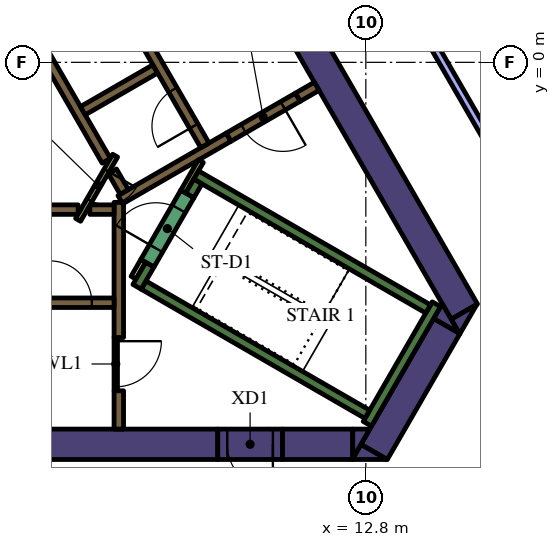
"""IFC4 building model, lengths in metres.
Left out: names, types, materials, properties, quantities, classifications, styles, units other than length and angle.
Written with IfcOpenShell. Run it as: python <this file> out.ifc"""

import sys

from ifc_helpers import new_model, si_unit, direction, frame, frame_2d, origin, place, context, subcontext, project, spatial, polyline, rectangle, outline, extrude, element, fill, save


model = new_model("IFC4")
c1 = context("Model", 3, precision=1e-05, world=origin(), true_north=direction((0.0, 1.0)))
c2 = subcontext(c1, "Body", "Model", "MODEL_VIEW")
j1 = project(units=[si_unit("LENGTHUNIT", "METRE"), si_unit("PLANEANGLEUNIT", "RADIAN")], contexts=[c1])
p1 = place(None, origin())
s1 = spatial("IfcSite", under=j1, at=p1, CompositionType="ELEMENT")
p2 = place(p1, origin())
s2 = spatial("IfcBuilding", under=s1, at=p2, CompositionType="ELEMENT")
p3 = place(p2, frame((0.0, 0.0, 141.6)))
s3 = spatial("IfcBuildingStorey", under=s2, at=p3, CompositionType="ELEMENT", Elevation=141.6)
p4 = place(p3, frame((9.129, 4.289, 0.0), z_axis=(0.0, 0.0, 1.0), x_axis=(0.499995742806, -0.866027861663, 0.0)))
e1 = element("IfcWall", 1, at=p4, inside=s3, PredefinedType="SOLIDWALL", context=c2, shape_type="SweptSolid", body=[
    extrude(rectangle(XDim=12.527, YDim=0.8, at=frame_2d((6.264, 0.0))), origin(), (0.0, 0.0, 1.0), 4.2),
])
p5 = place(p3, origin())
e2 = element("IfcWall", 2, at=p5, inside=s3, PredefinedType="SOLIDWALL", context=c2, shape_type="SweptSolid", body=[
    extrude(outline(polyline([(15.271, -7.15), (15.047, -6.762), (15.719, -6.374), (15.271, -7.15)])), origin(), (0.0, 0.0, 1.0), 4.2),
])
p6 = place(p3, frame((13.018, -10.252, 0.0), z_axis=(0.0, 0.0, 1.0), x_axis=(0.499984020225, 0.866034629516, 0.0)))
e3 = element("IfcWall", 3, at=p6, inside=s3, PredefinedType="SOLIDWALL", context=c2, shape_type="SweptSolid", body=[
    extrude(rectangle(XDim=3.824, YDim=0.8, at=frame_2d((1.912, 0.0))), origin(), (0.0, 0.0, 1.0), 4.2),
])
e4 = element("IfcWall", 4, at=p5, inside=s3, PredefinedType="SOLIDWALL", context=c2, shape_type="SweptSolid", body=[
    extrude(outline(polyline([(12.671, -10.053), (13.358, -10.45), (12.442, -10.45), (12.671, -10.053)])), origin(), (0.0, 0.0, 1.0), 4.2),
])
e5 = element("IfcWall", 5, at=p5, inside=s3, PredefinedType="SOLIDWALL", context=c2, shape_type="SweptSolid", body=[
    extrude(outline(polyline([(14.809, -6.35), (15.257, -7.126), (14.585, -6.738), (14.809, -6.35)])), origin(), (0.0, 0.0, 1.0), 4.2),
])
p7 = place(p3, frame((10.604, -10.05, 0.0), z_axis=(0.0, 0.0, 1.0), x_axis=(1.0, 0.0, 0.0)))
e6 = element("IfcWall", 6, at=p7, inside=s3, PredefinedType="SOLIDWALL", context=c2, shape_type="SweptSolid", body=[
    extrude(rectangle(XDim=1.849, YDim=0.8, at=frame_2d((0.925, 0.0))), origin(), (0.0, 0.0, 1.0), 4.2),
])
e7 = element("IfcWall", 7, at=p5, inside=s3, PredefinedType="SOLIDWALL", context=c2, shape_type="SweptSolid", body=[
    extrude(outline(polyline([(12.904, -9.65), (12.456, -10.426), (12.456, -9.65), (12.904, -9.65)])), origin(), (0.0, 0.0, 1.0), 4.2),
])
p8 = place(p3, frame((-13.378, -10.05, 0.0), z_axis=(0.0, 0.0, 1.0), x_axis=(1.0, 0.0, 0.0)))
e8 = element("IfcWall", 8, at=p8, inside=s3, PredefinedType="SOLIDWALL", context=c2, shape_type="SweptSolid", body=[
    extrude(rectangle(XDim=22.282, YDim=0.8, at=frame_2d((11.141, 0.0))), origin(), (0.0, 0.0, 1.0), 4.2),
])
p9 = place(p3, frame((12.84, -9.511, 0.0), z_axis=(0.0, 0.0, 1.0), x_axis=(0.499997733992, 0.866026712061, 0.0)))
e9 = element("IfcWall", 9, at=p9, inside=s3, PredefinedType="SOLIDWALL", context=c2, shape_type="SweptSolid", body=[
    extrude(rectangle(XDim=3.634, YDim=0.25, at=frame_2d((1.817, 0.0))), origin(), (0.0, 0.0, 1.0), 4.2),
])
p10 = place(p3, frame((12.84, -9.261, 0.0), z_axis=(0.0, 0.0, 1.0), x_axis=(-0.866013990052, 0.500019768644, 0.0)))
e10 = element("IfcWall", 10, at=p10, inside=s3, PredefinedType="SOLIDWALL", context=c2, shape_type="SweptSolid", body=[
    extrude(rectangle(XDim=6.8, YDim=0.25, at=frame_2d((3.4, 0.0))), origin(), (0.0, 0.0, 1.0), 4.2),
])
p11 = place(p3, frame((6.78, -5.906, 0.0), z_axis=(0.0, 0.0, 1.0), x_axis=(0.500223362819, 0.865896406789, 0.0)))
e11 = element("IfcWall", 11, at=p11, inside=s3, PredefinedType="SOLIDWALL", context=c2, shape_type="SweptSolid", body=[
    extrude(rectangle(XDim=0.675, YDim=0.25, at=frame_2d((0.337, 0.0))), origin(), (0.0, 0.0, 1.0), 4.2),
])
p12 = place(p3, frame((8.334, -2.964, 0.0), z_axis=(0.0, 0.0, 1.0), x_axis=(0.866016039709, -0.500016218704, 0.0)))
e12 = element("IfcWall", 12, at=p12, inside=s3, PredefinedType="SOLIDWALL", context=c2, shape_type="SweptSolid", body=[
    extrude(rectangle(XDim=7.05, YDim=0.25, at=frame_2d((3.525, 0.0))), origin(), (0.0, 0.0, 1.0), 4.2),
])
p13 = place(p3, frame((8.168, -3.503, 0.0), z_axis=(0.0, 0.0, 1.0), x_axis=(0.49972245349, 0.866185586049, 0.0)))
e13 = element("IfcWall", 13, at=p13, inside=s3, PredefinedType="SOLIDWALL", context=c2, shape_type="SweptSolid", body=[
    extrude(rectangle(XDim=0.425, YDim=0.25, at=frame_2d((0.212, 0.0))), origin(), (0.0, 0.0, 1.0), 4.2),
])
p14 = place(p3, frame((-5.259, -3.875, 0.0), z_axis=(0.0, 0.0, 1.0), x_axis=(1.0, 0.0, 0.0)))
e14 = element("IfcWall", 14, at=p14, inside=s3, PredefinedType="SOLIDWALL", context=c2, shape_type="SweptSolid", body=[
    extrude(rectangle(XDim=10.489, YDim=0.25, at=frame_2d((5.244, 0.0))), origin(), (0.0, 0.0, 1.0), 4.2),
])
p15 = place(p3, frame((6.3, -7.24, 0.0), z_axis=(0.0, 0.0, 1.0), x_axis=(0.0, 1.0, 0.0)))
e15 = element("IfcWall", 15, at=p15, inside=s3, PredefinedType="SOLIDWALL", context=c2, shape_type="SweptSolid", body=[
    extrude(rectangle(XDim=3.556, YDim=0.25, at=frame_2d((1.778, 0.0))), origin(), (0.0, 0.0, 1.0), 4.2),
])
p16 = place(p3, frame((6.3, -9.65, 0.0), z_axis=(0.0, 0.0, 1.0), x_axis=(0.0, 1.0, 0.0)))
e16 = element("IfcWall", 16, at=p16, inside=s3, PredefinedType="SOLIDWALL", context=c2, shape_type="SweptSolid", body=[
    extrude(rectangle(XDim=1.008, YDim=0.25, at=frame_2d((0.504, 0.0))), origin(), (0.0, 0.0, 1.0), 4.2),
])
p17 = place(p3, frame((5.538, -3.875, 0.0), z_axis=(0.0, 0.0, 1.0), x_axis=(1.0, 0.0, 0.0)))
e17 = element("IfcWall", 17, at=p17, inside=s3, PredefinedType="SOLIDWALL", context=c2, shape_type="SweptSolid", body=[
    extrude(rectangle(XDim=0.637, YDim=0.25, at=frame_2d((0.318, 0.0))), origin(), (0.0, 0.0, 1.0), 4.2),
])
p18 = place(p3, frame((9.19, -1.969, 0.0), z_axis=(0.0, 0.0, 1.0), x_axis=(-0.866057109641, -0.499945079824, 0.0)))
e18 = element("IfcWall", 18, at=p18, inside=s3, PredefinedType="SOLIDWALL", context=c2, shape_type="SweptSolid", body=[
    extrude(rectangle(XDim=3.291, YDim=0.25, at=frame_2d((1.646, 0.0))), origin(), (0.0, 0.0, 1.0), 4.2),
])
p19 = place(p3, frame((6.13, -2.867, 0.0), z_axis=(0.0, 0.0, 1.0), x_axis=(0.500160776593, -0.865932559475, 0.0)))
e19 = element("IfcWall", 19, at=p19, inside=s3, PredefinedType="SOLIDWALL", context=c2, shape_type="SweptSolid", body=[
    extrude(rectangle(XDim=0.627, YDim=0.25, at=frame_2d((0.313, 0.0))), origin(), (0.0, 0.0, 1.0), 4.2),
])
p20 = place(p3, frame((11.507, -0.631, 0.0), z_axis=(0.0, 0.0, 1.0), x_axis=(-0.866093731455, -0.499881634324, 0.0)))
e20 = element("IfcWall", 20, at=p20, inside=s3, PredefinedType="SOLIDWALL", context=c2, shape_type="SweptSolid", body=[
    extrude(rectangle(XDim=0.575, YDim=0.25, at=frame_2d((0.288, 0.0))), origin(), (0.0, 0.0, 1.0), 4.2),
])
p21 = place(p3, frame((5.97, -2.591, 0.0), z_axis=(0.0, 0.0, 1.0), x_axis=(-0.499994469932, 0.866028596547, 0.0)))
e21 = element("IfcWall", 21, at=p21, inside=s3, PredefinedType="SOLIDWALL", context=c2, shape_type="SweptSolid", body=[
    extrude(rectangle(XDim=10.488, YDim=0.25, at=frame_2d((5.244, 0.0))), origin(), (0.0, 0.0, 1.0), 4.2),
])
p22 = place(p3, frame((5.354, -1.274, 0.0), z_axis=(0.0, 0.0, 1.0), x_axis=(0.866008176907, 0.50002983664, 0.0)))
e22 = element("IfcWall", 22, at=p22, inside=s3, PredefinedType="SOLIDWALL", context=c2, shape_type="SweptSolid", body=[
    extrude(rectangle(XDim=2.2, YDim=0.25, at=frame_2d((1.1, 0.0))), origin(), (0.0, 0.0, 1.0), 4.2),
])
p23 = place(p3, frame((6.945, -5.222, 0.0), z_axis=(0.0, 0.0, 1.0), x_axis=(-0.499818422106, -0.866130212453, 0.0)))
e23 = element("IfcWall", 23, at=p23, inside=s3, PredefinedType="PARTITIONING", context=c2, shape_type="SweptSolid", body=[
    extrude(rectangle(XDim=0.514, YDim=0.15, at=frame_2d((0.257, 0.0))), origin(), (0.0, 0.0, 1.0), 3.15),
])
p24 = place(p3, frame((8.459, -2.599, 0.0), z_axis=(0.0, 0.0, 1.0), x_axis=(-0.500041054325, -0.866001699761, 0.0)))
e24 = element("IfcWall", 24, at=p24, inside=s3, PredefinedType="PARTITIONING", context=c2, shape_type="SweptSolid", body=[
    extrude(rectangle(XDim=0.929, YDim=0.15, at=frame_2d((0.464, 0.0))), origin(), (0.0, 0.0, 1.0), 4.2),
])
p25 = place(p3, frame((-6.175, -6.325, 0.0), z_axis=(0.0, 0.0, 1.0), x_axis=(1.0, 0.0, 0.0)))
e25 = element("IfcWall", 25, at=p25, inside=s3, PredefinedType="SOLIDWALL", context=c2, shape_type="SweptSolid", body=[
    extrude(rectangle(XDim=12.35, YDim=0.25, at=frame_2d((6.175, 0.0))), origin(), (0.0, 0.0, 1.0), 4.2),
])
p26 = place(p25, frame((0.585, 0.0, 0.0)))
e26 = element("IfcOpeningElement", 26, at=p26, cuts=e25, PredefinedType="OPENING", context=c2, shape_type="SweptSolid", body=[
    extrude(rectangle(XDim=1.1, YDim=2.1, at=frame_2d((0.55, 1.05))), frame((0.0, 0.135, 0.0), z_axis=(0.0, -1.0, 0.0), x_axis=(1.0, 0.0, 0.0)), (0.0, 0.0, 1.0), 0.27),
])
p27 = place(p25, frame((3.105, 0.0, 0.0)))
e27 = element("IfcOpeningElement", 27, at=p27, cuts=e25, PredefinedType="OPENING", context=c2, shape_type="SweptSolid", body=[
    extrude(rectangle(XDim=1.1, YDim=2.1, at=frame_2d((0.55, 1.05))), frame((0.0, 0.135, 0.0), z_axis=(0.0, -1.0, 0.0), x_axis=(1.0, 0.0, 0.0)), (0.0, 0.0, 1.0), 0.27),
])
p28 = place(p25, frame((5.625, 0.0, 0.0)))
e28 = element("IfcOpeningElement", 28, at=p28, cuts=e25, PredefinedType="OPENING", context=c2, shape_type="SweptSolid", body=[
    extrude(rectangle(XDim=1.1, YDim=2.1, at=frame_2d((0.55, 1.05))), frame((0.0, 0.135, 0.0), z_axis=(0.0, -1.0, 0.0), x_axis=(1.0, 0.0, 0.0)), (0.0, 0.0, 1.0), 0.27),
])
p29 = place(p25, frame((8.145, 0.0, 0.0)))
e29 = element("IfcOpeningElement", 29, at=p29, cuts=e25, PredefinedType="OPENING", context=c2, shape_type="SweptSolid", body=[
    extrude(rectangle(XDim=1.1, YDim=2.1, at=frame_2d((0.55, 1.05))), frame((0.0, 0.135, 0.0), z_axis=(0.0, -1.0, 0.0), x_axis=(1.0, 0.0, 0.0)), (0.0, 0.0, 1.0), 0.27),
])
p30 = place(p25, frame((10.665, 0.0, 0.0)))
e30 = element("IfcOpeningElement", 30, at=p30, cuts=e25, PredefinedType="OPENING", context=c2, shape_type="SweptSolid", body=[
    extrude(rectangle(XDim=1.1, YDim=2.1, at=frame_2d((0.55, 1.05))), frame((0.0, 0.135, 0.0), z_axis=(0.0, -1.0, 0.0), x_axis=(1.0, 0.0, 0.0)), (0.0, 0.0, 1.0), 0.27),
])
p31 = place(p3, frame((8.565, -2.185, 0.0), z_axis=(0.0, 0.0, 1.0), x_axis=(-0.499997954832, 0.866026584559, 0.0)))
e31 = element("IfcWall", 31, at=p31, inside=s3, PredefinedType="SOLIDWALL", context=c2, shape_type="SweptSolid", body=[
    extrude(rectangle(XDim=12.35, YDim=0.25, at=frame_2d((6.175, 0.0))), origin(), (0.0, 0.0, 1.0), 4.2),
])
p32 = place(p31, frame((0.585, 0.0, 0.0)))
e32 = element("IfcOpeningElement", 32, at=p32, cuts=e31, PredefinedType="OPENING", context=c2, shape_type="SweptSolid", body=[
    extrude(rectangle(XDim=1.1, YDim=2.1, at=frame_2d((0.55, 1.05))), frame((0.0, 0.135, 0.0), z_axis=(0.0, -1.0, 0.0), x_axis=(1.0, 0.0, 0.0)), (0.0, 0.0, 1.0), 0.27),
])
p33 = place(p3, frame((7.053, -5.284, 0.0), z_axis=(0.0, 0.0, 1.0), x_axis=(0.500078061341, 0.865980330357, 0.0)))
e33 = element("IfcWall", 33, at=p33, inside=s3, PredefinedType="SOLIDWALL", context=c2, shape_type="SweptSolid", body=[
    extrude(rectangle(XDim=2.1, YDim=0.4, at=frame_2d((1.05, 0.0))), origin(), (0.0, 0.0, 1.0), 4.2),
])
p34 = place(p33, frame((0.45, 0.0, 0.0)))
e34 = element("IfcOpeningElement", 34, at=p34, cuts=e33, PredefinedType="OPENING", context=c2, shape_type="SweptSolid", body=[
    extrude(rectangle(XDim=1.2, YDim=2.1, at=frame_2d((0.6, 1.05))), frame((0.0, 0.21, 0.0), z_axis=(0.0, -1.0, 0.0), x_axis=(1.0, 0.0, 0.0)), (0.0, 0.0, 1.0), 0.42),
])
p35 = place(p3, frame((6.203, -2.456, 0.0), z_axis=(0.0, 0.0, 1.0), x_axis=(-0.500043961785, -0.866000020948, 0.0)))
e35 = element("IfcWall", 35, at=p35, inside=s3, PredefinedType="PARTITIONING", context=c2, shape_type="SweptSolid", body=[
    extrude(rectangle(XDim=1.95, YDim=0.15, at=frame_2d((0.975, 0.0))), origin(), (0.0, 0.0, 1.0), 4.2),
])
p36 = place(p35, frame((0.45, 0.0, 0.0)))
e36 = element("IfcOpeningElement", 36, at=p36, cuts=e35, PredefinedType="OPENING", context=c2, shape_type="SweptSolid", body=[
    extrude(rectangle(XDim=0.9, YDim=2.1, at=frame_2d((0.45, 1.05))), frame((0.0, 0.085, 0.0), z_axis=(0.0, -1.0, 0.0), x_axis=(1.0, 0.0, 0.0)), (0.0, 0.0, 1.0), 0.17),
])
p37 = place(p3, frame((6.22, -7.237, 0.0), z_axis=(0.0, 0.0, 1.0), x_axis=(0.0, -1.0, 0.0)))
e37 = element("IfcWall", 37, at=p37, inside=s3, PredefinedType="PARTITIONING", context=c2, shape_type="SweptSolid", body=[
    extrude(rectangle(XDim=1.4, YDim=0.09, at=frame_2d((0.7, 0.0))), origin(), (0.0, 0.0, 1.0), 3.15),
])
p38 = place(p37, frame((0.1, 0.0, 0.0)))
e38 = element("IfcOpeningElement", 38, at=p38, cuts=e37, PredefinedType="OPENING", context=c2, shape_type="SweptSolid", body=[
    extrude(rectangle(XDim=1.2, YDim=2.1, at=frame_2d((0.6, 1.05))), frame((0.0, 0.055, 0.0), z_axis=(0.0, -1.0, 0.0), x_axis=(1.0, 0.0, 0.0)), (0.0, 0.0, 1.0), 0.11),
])
p39 = place(p3, frame((11.009, -0.919, 0.0), z_axis=(0.0, 0.0, 1.0), x_axis=(-0.866059744384, -0.49994051562, 0.0)))
e39 = element("IfcWall", 39, at=p39, inside=s3, PredefinedType="SOLIDWALL", context=c2, shape_type="SweptSolid", body=[
    extrude(rectangle(XDim=2.1, YDim=0.25, at=frame_2d((1.05, 0.0))), origin(), (0.0, 0.0, 1.0), 4.2),
])
p40 = place(p39, frame((0.45, 0.0, 0.0)))
e40 = element("IfcOpeningElement", 40, at=p40, cuts=e39, PredefinedType="OPENING", context=c2, shape_type="SweptSolid", body=[
    extrude(rectangle(XDim=1.2, YDim=2.1, at=frame_2d((0.6, 1.05))), frame((0.0, 0.135, 0.0), z_axis=(0.0, -1.0, 0.0), x_axis=(1.0, 0.0, 0.0)), (0.0, 0.0, 1.0), 0.27),
])
p41 = place(p3, frame((10.604, -10.05, 0.0), z_axis=(0.0, 0.0, 1.0), x_axis=(-1.0, 0.0, 0.0)))
e41 = element("IfcWall", 41, at=p41, inside=s3, PredefinedType="SOLIDWALL", context=c2, shape_type="SweptSolid", body=[
    extrude(rectangle(XDim=1.7, YDim=0.8, at=frame_2d((0.85, 0.0))), origin(), (0.0, 0.0, 1.0), 4.2),
])
p42 = place(p41, frame((0.25, 0.0, 0.0)))
e42 = element("IfcOpeningElement", 42, at=p42, cuts=e41, PredefinedType="OPENING", context=c2, shape_type="SweptSolid", body=[
    extrude(rectangle(XDim=1.2, YDim=2.1, at=frame_2d((0.6, 1.05))), frame((0.0, 0.41, 0.0), z_axis=(0.0, -1.0, 0.0), x_axis=(1.0, 0.0, 0.0)), (0.0, 0.0, 1.0), 0.82),
])
p43 = place(p3, frame((14.825, -12.722, 0.0), z_axis=(0.0, 0.0, 1.0), x_axis=(0.499981686864, 0.86603597662, 0.0)))
e43 = element("IfcWall", 43, at=p43, inside=s3, PredefinedType="PARTITIONING", context=c2, shape_type="SweptSolid", body=[
    extrude(rectangle(XDim=3.506, YDim=0.2, at=frame_2d((1.753, 0.0))), origin(), (0.0, 0.0, 1.0), 3.15),
])
p44 = place(p3, frame((18.504, -6.35, 0.0), z_axis=(0.0, 0.0, 1.0), x_axis=(-0.499995029582, 0.866028273438, 0.0)))
e44 = element("IfcWall", 44, at=p44, inside=s3, PredefinedType="PARTITIONING", context=c2, shape_type="SweptSolid", body=[
    extrude(rectangle(XDim=9.717, YDim=0.2, at=frame_2d((4.859, 0.0))), origin(), (0.0, 0.0, 1.0), 3.15),
])
p45 = place(p30, origin())
e45 = element("IfcDoor", 45, at=p45, inside=s3, OperationType="DOUBLE_DOOR_SLIDING", PredefinedType="DOOR", context=c2, shape_type="SweptSolid", body=[
    extrude(rectangle(XDim=1.1, YDim=2.1, at=frame_2d((0.55, 1.05))), frame((0.0, 0.025, 0.0), z_axis=(0.0, -1.0, 0.0), x_axis=(1.0, 0.0, 0.0)), (0.0, 0.0, 1.0), 0.05),
])
fill(e30, e45)
p46 = place(p32, origin())
e46 = element("IfcDoor", 46, at=p46, inside=s3, OperationType="DOUBLE_DOOR_SLIDING", PredefinedType="DOOR", context=c2, shape_type="SweptSolid", body=[
    extrude(rectangle(XDim=1.1, YDim=2.1, at=frame_2d((0.55, 1.05))), frame((0.0, 0.025, 0.0), z_axis=(0.0, -1.0, 0.0), x_axis=(1.0, 0.0, 0.0)), (0.0, 0.0, 1.0), 0.05),
])
fill(e32, e46)
p47 = place(p34, origin())
e47 = element("IfcDoor", 47, at=p47, inside=s3, OperationType="SINGLE_SWING_LEFT", PredefinedType="DOOR", context=c2, shape_type="SweptSolid", body=[
    extrude(rectangle(XDim=1.2, YDim=2.1, at=frame_2d((0.6, 1.05))), frame((0.0, 0.025, 0.0), z_axis=(0.0, -1.0, 0.0), x_axis=(1.0, 0.0, 0.0)), (0.0, 0.0, 1.0), 0.05),
])
fill(e34, e47)
p48 = place(p36, origin())
e48 = element("IfcDoor", 48, at=p48, inside=s3, OperationType="SINGLE_SWING_LEFT", PredefinedType="DOOR", context=c2, shape_type="SweptSolid", body=[
    extrude(rectangle(XDim=0.9, YDim=2.1, at=frame_2d((0.45, 1.05))), frame((0.0, 0.025, 0.0), z_axis=(0.0, -1.0, 0.0), x_axis=(1.0, 0.0, 0.0)), (0.0, 0.0, 1.0), 0.05),
])
fill(e36, e48)
p49 = place(p38, origin())
e49 = element("IfcDoor", 49, at=p49, inside=s3, OperationType="SINGLE_SWING_LEFT", PredefinedType="DOOR", context=c2, shape_type="SweptSolid", body=[
    extrude(rectangle(XDim=1.2, YDim=2.1, at=frame_2d((0.6, 1.05))), frame((0.0, 0.025, 0.0), z_axis=(0.0, -1.0, 0.0), x_axis=(1.0, 0.0, 0.0)), (0.0, 0.0, 1.0), 0.05),
])
fill(e38, e49)
p50 = place(p40, origin())
e50 = element("IfcDoor", 50, at=p50, inside=s3, OperationType="SINGLE_SWING_LEFT", PredefinedType="DOOR", context=c2, shape_type="SweptSolid", body=[
    extrude(rectangle(XDim=1.2, YDim=2.1, at=frame_2d((0.6, 1.05))), frame((0.0, 0.025, 0.0), z_axis=(0.0, -1.0, 0.0), x_axis=(1.0, 0.0, 0.0)), (0.0, 0.0, 1.0), 0.05),
])
fill(e40, e50)
p51 = place(p42, origin())
e51 = element("IfcDoor", 51, at=p51, inside=s3, OperationType="SINGLE_SWING_LEFT", PredefinedType="DOOR", context=c2, shape_type="SweptSolid", body=[
    extrude(rectangle(XDim=1.2, YDim=2.1, at=frame_2d((0.6, 1.05))), frame((0.0, 0.025, 0.0), z_axis=(0.0, -1.0, 0.0), x_axis=(1.0, 0.0, 0.0)), (0.0, 0.0, 1.0), 0.05),
])
fill(e42, e51)
save(model, sys.argv[1])
